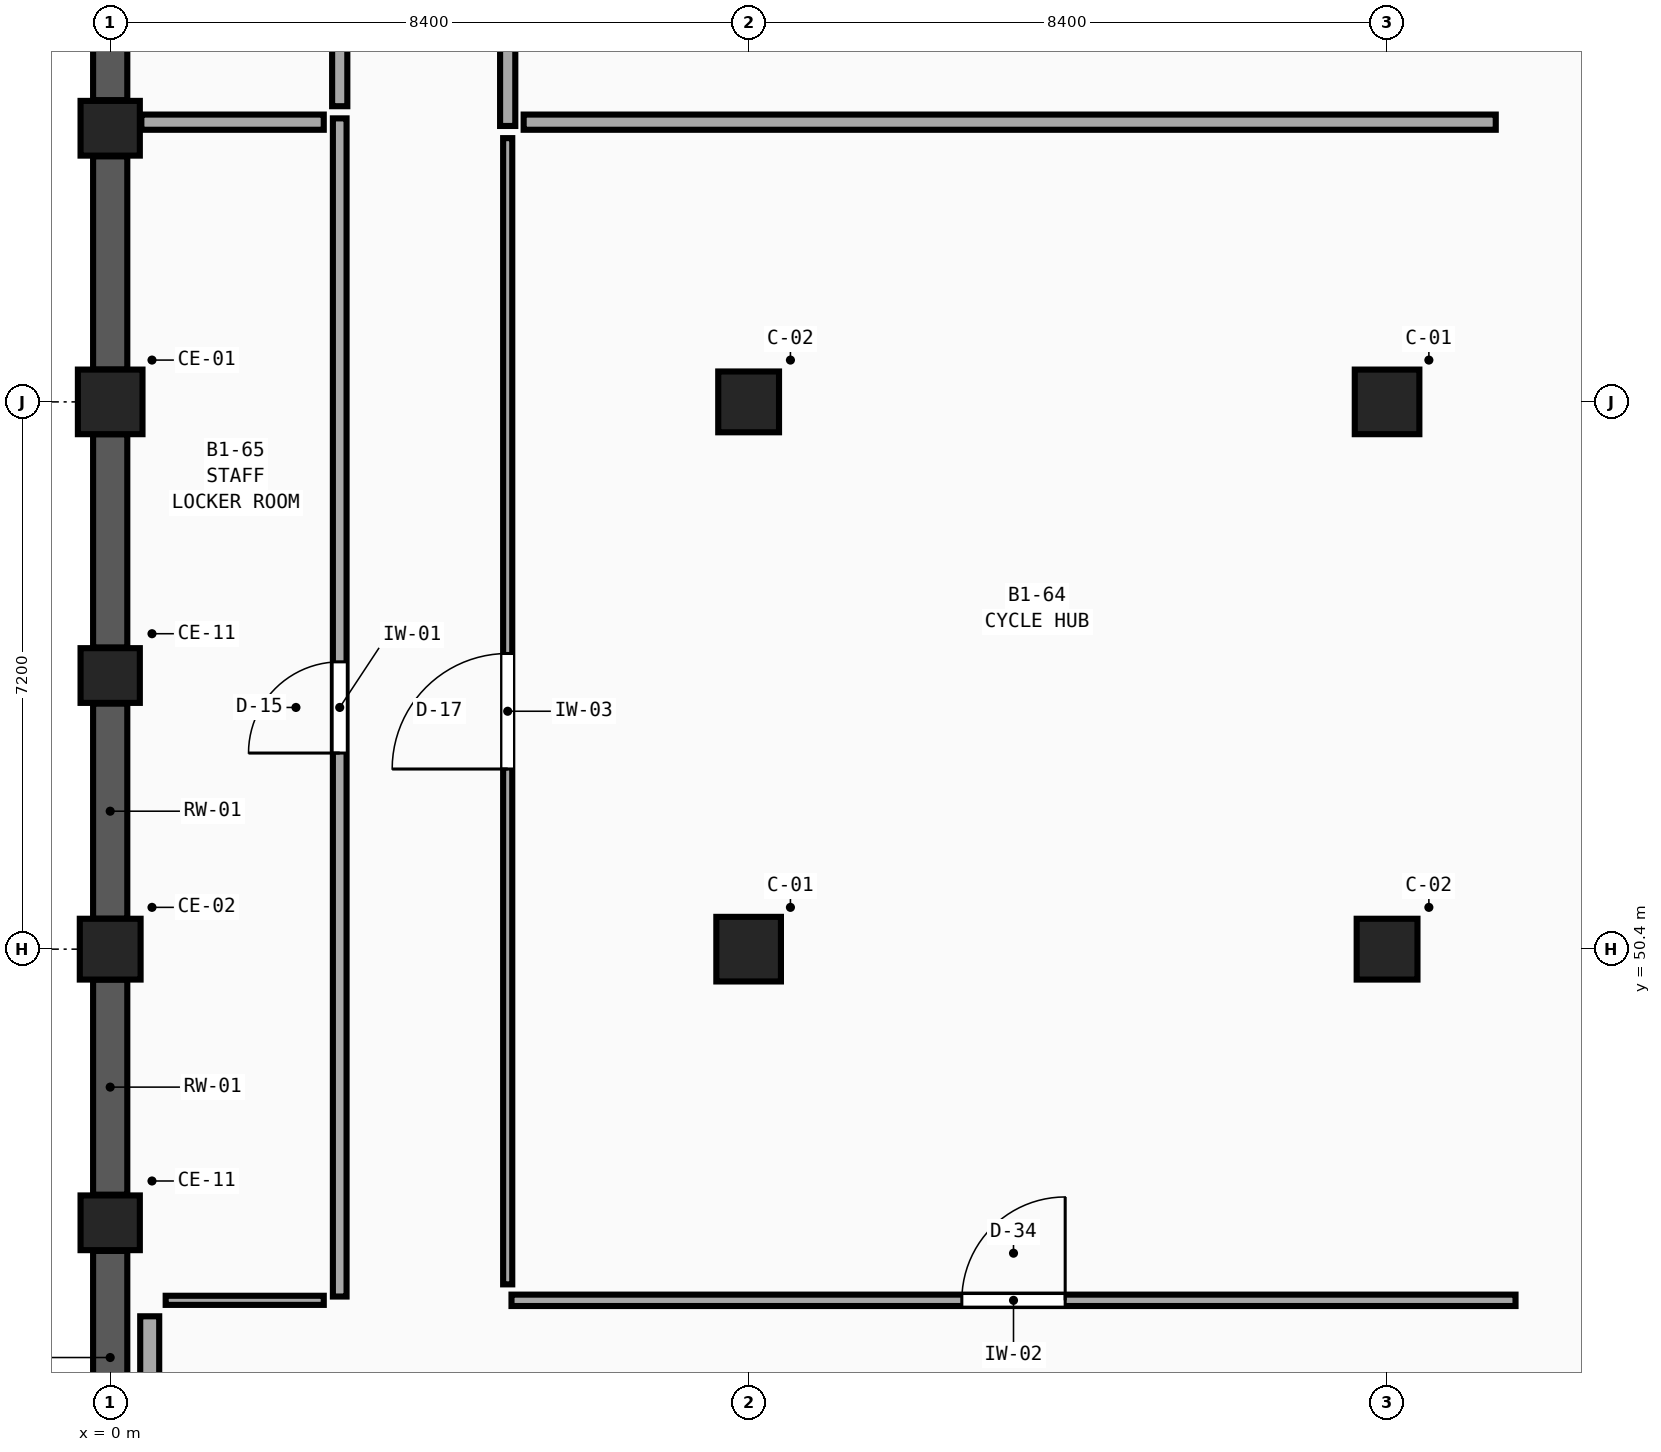
"""IFC4 building model, lengths in metres.
Left out: names, types, materials, properties, quantities, classifications, styles, units other than length and angle.
Written with IfcOpenShell. Run it as: python <this file> out.ifc"""

import sys

from ifc_helpers import new_model, si_unit, direction, frame, frame_2d, origin, origin_2d, place, context, subcontext, project, spatial, rectangle, extrude, element, fill, save


model = new_model("IFC4")
c1 = context("Model", 3, precision=1e-05, world=origin(), true_north=direction((0.0, 1.0)))
c2 = subcontext(c1, "Body", "Model", "MODEL_VIEW")
j1 = project(units=[si_unit("LENGTHUNIT", "METRE"), si_unit("PLANEANGLEUNIT", "RADIAN")], contexts=[c1])
p1 = place(None, origin())
s1 = spatial("IfcSite", under=j1, at=p1, CompositionType="ELEMENT")
p2 = place(p1, origin())
s2 = spatial("IfcBuilding", under=s1, at=p2, CompositionType="ELEMENT")
p3 = place(p2, frame((0.0, 0.0, -5.4)))
s3 = spatial("IfcBuildingStorey", under=s2, at=p3, CompositionType="ELEMENT", Elevation=-5.4)
p4 = place(p3, frame((0.0, 50.4, 0.0), z_axis=(0.0, 0.0, 1.0), x_axis=(1.0, 0.0, 0.0)))
e1 = element("IfcColumn", 1, at=p4, inside=s3, PredefinedType="COLUMN", context=c2, shape_type="SweptSolid", body=[
    extrude(rectangle(XDim=0.8, YDim=0.8, at=origin_2d()), origin(), (0.0, 0.0, 1.0), 5.4),
])
for number, where, z_axis, x_axis in (
    (2, (0.0, 57.6, 0.0), (0.0, 0.0, 1.0), (1.0, 0.0, 0.0)),
    (3, (8.4, 50.4, 0.0), (0.0, 0.0, 1.0), (1.0, 0.0, 0.0)),
):
    element("IfcColumn", number, at=place(p3, frame(where, z_axis=z_axis, x_axis=x_axis)), inside=s3, PredefinedType="COLUMN", context=c2, shape_type="SweptSolid", body=[
        extrude(rectangle(XDim=0.85, YDim=0.85, at=origin_2d()), origin(), (0.0, 0.0, 1.0), 5.4),
    ])
for number, where, z_axis, x_axis in (
    (4, (8.4, 57.6, 0.0), (0.0, 0.0, 1.0), (1.0, 0.0, 0.0)),
    (5, (16.8, 50.4, 0.0), (0.0, 0.0, 1.0), (1.0, 0.0, 0.0)),
):
    element("IfcColumn", number, at=place(p3, frame(where, z_axis=z_axis, x_axis=x_axis)), inside=s3, PredefinedType="COLUMN", context=c2, shape_type="SweptSolid", body=[
        extrude(rectangle(XDim=0.8, YDim=0.8, at=origin_2d()), origin(), (0.0, 0.0, 1.0), 5.4),
    ])
p5 = place(p3, frame((16.8, 57.6, 0.0), z_axis=(0.0, 0.0, 1.0), x_axis=(1.0, 0.0, 0.0)))
e6 = element("IfcColumn", 6, at=p5, inside=s3, PredefinedType="COLUMN", context=c2, shape_type="SweptSolid", body=[
    extrude(rectangle(XDim=0.85, YDim=0.85, at=origin_2d()), origin(), (0.0, 0.0, 1.0), 5.4),
])
for number, where, z_axis, x_axis in (
    (7, (0.0, 46.8, 0.0), (0.0, 0.0, 1.0), (1.0, 0.0, 0.0)),
    (8, (0.0, 54.0, 0.0), (0.0, 0.0, 1.0), (1.0, 0.0, 0.0)),
    (9, (0.0, 61.2, 0.0), (0.0, 0.0, 1.0), (1.0, 0.0, 0.0)),
):
    element("IfcColumn", number, at=place(p3, frame(where, z_axis=z_axis, x_axis=x_axis)), inside=s3, PredefinedType="PILASTER", context=c2, shape_type="SweptSolid", body=[
        extrude(rectangle(XDim=0.78, YDim=0.72, at=origin_2d()), origin(), (0.0, 0.0, 1.0), 5.4),
    ])
p6 = place(p3, frame((0.0, 43.625, 0.0), z_axis=(0.0, 0.0, 1.0), x_axis=(0.0, 1.0, 0.0)))
e10 = element("IfcWall", 10, at=p6, inside=s3, PredefinedType="USERDEFINED", context=c2, shape_type="SweptSolid", body=[
    extrude(rectangle(XDim=2.805, YDim=0.45, at=frame_2d((1.402, 0.0))), origin(), (0.0, 0.0, 1.0), 4.5),
])
p7 = place(p3, frame((0.0, 47.17, 0.0), z_axis=(0.0, 0.0, 1.0), x_axis=(0.0, 1.0, 0.0)))
e11 = element("IfcWall", 11, at=p7, inside=s3, PredefinedType="USERDEFINED", context=c2, shape_type="SweptSolid", body=[
    extrude(rectangle(XDim=2.83, YDim=0.45, at=frame_2d((1.415, 0.0))), origin(), (0.0, 0.0, 1.0), 4.5),
])
p8 = place(p3, frame((0.0, 50.8, 0.0), z_axis=(0.0, 0.0, 1.0), x_axis=(0.0, 1.0, 0.0)))
e12 = element("IfcWall", 12, at=p8, inside=s3, PredefinedType="USERDEFINED", context=c2, shape_type="SweptSolid", body=[
    extrude(rectangle(XDim=2.83, YDim=0.45, at=frame_2d((1.415, 0.0))), origin(), (0.0, 0.0, 1.0), 4.5),
])
p9 = place(p3, frame((0.0, 54.37, 0.0), z_axis=(0.0, 0.0, 1.0), x_axis=(0.0, 1.0, 0.0)))
e13 = element("IfcWall", 13, at=p9, inside=s3, PredefinedType="USERDEFINED", context=c2, shape_type="SweptSolid", body=[
    extrude(rectangle(XDim=2.805, YDim=0.45, at=frame_2d((1.402, 0.0))), origin(), (0.0, 0.0, 1.0), 4.5),
])
p10 = place(p3, frame((0.0, 58.025, 0.0), z_axis=(0.0, 0.0, 1.0), x_axis=(0.0, 1.0, 0.0)))
e14 = element("IfcWall", 14, at=p10, inside=s3, PredefinedType="USERDEFINED", context=c2, shape_type="SweptSolid", body=[
    extrude(rectangle(XDim=2.805, YDim=0.45, at=frame_2d((1.403, 0.0))), origin(), (0.0, 0.0, 1.0), 4.5),
])
p11 = place(p3, frame((0.0, 61.57, 0.0), z_axis=(0.0, 0.0, 1.0), x_axis=(0.0, 1.0, 0.0)))
e15 = element("IfcWall", 15, at=p11, inside=s3, PredefinedType="USERDEFINED", context=c2, shape_type="SweptSolid", body=[
    extrude(rectangle(XDim=2.855, YDim=0.45, at=frame_2d((1.427, 0.0))), origin(), (0.0, 0.0, 1.0), 4.5),
])
p12 = place(p3, frame((3.02, 45.83, 0.0), z_axis=(0.0, 0.0, 1.0), x_axis=(0.0, 1.0, 0.0)))
e16 = element("IfcWall", 16, at=p12, inside=s3, PredefinedType="PARTITIONING", context=c2, shape_type="SweptSolid", body=[
    extrude(rectangle(XDim=15.5, YDim=0.18, at=frame_2d((7.75, 0.0))), origin(), (0.0, 0.0, 1.0), 5.05),
])
p13 = place(p12, frame((7.15, 0.0, 0.0)))
e17 = element("IfcOpeningElement", 17, at=p13, cuts=e16, PredefinedType="OPENING", context=c2, shape_type="SweptSolid", body=[
    extrude(rectangle(XDim=1.2, YDim=2.21, at=frame_2d((0.6, 1.105))), frame((0.0, 0.11, 0.0), z_axis=(0.0, -1.0, 0.0), x_axis=(1.0, 0.0, 0.0)), (0.0, 0.0, 1.0), 0.22),
])
p14 = place(p3, frame((5.23, 45.99, 0.0), z_axis=(0.0, 0.0, 1.0), x_axis=(0.0, 1.0, 0.0)))
e18 = element("IfcWall", 18, at=p14, inside=s3, PredefinedType="PARTITIONING", context=c2, shape_type="SweptSolid", body=[
    extrude(rectangle(XDim=15.08, YDim=0.12, at=frame_2d((7.54, 0.0))), origin(), (0.0, 0.0, 1.0), 5.05),
])
p15 = place(p14, frame((6.78, 0.0, 0.0)))
e19 = element("IfcOpeningElement", 19, at=p15, cuts=e18, PredefinedType="OPENING", context=c2, shape_type="SweptSolid", body=[
    extrude(rectangle(XDim=1.52, YDim=2.21, at=frame_2d((0.76, 1.105))), frame((0.0, 0.08, 0.0), z_axis=(0.0, -1.0, 0.0), x_axis=(1.0, 0.0, 0.0)), (0.0, 0.0, 1.0), 0.16),
])
p16 = place(p3, frame((5.28, 45.78, 0.0), z_axis=(0.0, 0.0, 1.0), x_axis=(1.0, 0.0, 0.0)))
e20 = element("IfcWall", 20, at=p16, inside=s3, PredefinedType="PARTITIONING", context=c2, shape_type="SweptSolid", body=[
    extrude(rectangle(XDim=13.21, YDim=0.15, at=frame_2d((6.605, 0.0))), origin(), (0.0, 0.0, 1.0), 5.05),
])
p17 = place(p16, frame((5.925, 0.0, 0.0)))
e21 = element("IfcOpeningElement", 21, at=p17, cuts=e20, PredefinedType="OPENING", context=c2, shape_type="SweptSolid", body=[
    extrude(rectangle(XDim=1.36, YDim=2.45, at=frame_2d((0.68, 1.225))), frame((0.0, 0.095, 0.0), z_axis=(0.0, -1.0, 0.0), x_axis=(1.0, 0.0, 0.0)), (0.0, 0.0, 1.0), 0.19),
])
p18 = place(p3, frame((5.23, 61.23, 0.0), z_axis=(0.0, 0.0, 1.0), x_axis=(0.0, 1.0, 0.0)))
e22 = element("IfcWall", 22, at=p18, inside=s3, PredefinedType="PLUMBINGWALL", context=c2, shape_type="SweptSolid", body=[
    extrude(rectangle(XDim=9.04, YDim=0.2, at=frame_2d((4.52, 0.0))), origin(), (0.0, 0.0, 1.0), 5.05),
])
p19 = place(p18, frame((3.84, 0.0, 0.0)))
e23 = element("IfcOpeningElement", 23, at=p19, cuts=e22, PredefinedType="OPENING", context=c2, shape_type="SweptSolid", body=[
    extrude(rectangle(XDim=1.36, YDim=2.29, at=frame_2d((0.68, 1.145))), frame((0.0, 0.12, 0.0), z_axis=(0.0, -1.0, 0.0), x_axis=(1.0, 0.0, 0.0)), (0.0, 0.0, 1.0), 0.24),
])
p20 = place(p3, frame((3.02, 61.49, 0.0), z_axis=(0.0, 0.0, 1.0), x_axis=(0.0, 1.0, 0.0)))
e24 = element("IfcWall", 24, at=p20, inside=s3, PredefinedType="PLUMBINGWALL", context=c2, shape_type="SweptSolid", body=[
    extrude(rectangle(XDim=8.78, YDim=0.2, at=frame_2d((4.39, 0.0))), origin(), (0.0, 0.0, 1.0), 5.05),
])
p21 = place(p20, frame((3.63, 0.0, 0.0)))
e25 = element("IfcOpeningElement", 25, at=p21, cuts=e24, PredefinedType="OPENING", context=c2, shape_type="SweptSolid", body=[
    extrude(rectangle(XDim=1.52, YDim=2.29, at=frame_2d((0.76, 1.145))), frame((0.0, 0.12, 0.0), z_axis=(0.0, -1.0, 0.0), x_axis=(1.0, 0.0, 0.0)), (0.0, 0.0, 1.0), 0.24),
])
p22 = place(p3, frame((0.73, 45.78, 0.0), z_axis=(0.0, 0.0, 1.0), x_axis=(1.0, 0.0, 0.0)))
e26 = element("IfcWall", 26, at=p22, inside=s3, PredefinedType="PARTITIONING", context=c2, shape_type="SweptSolid", body=[
    extrude(rectangle(XDim=2.08, YDim=0.12, at=frame_2d((1.04, 0.0))), origin(), (0.0, 0.0, 1.0), 5.05),
])
p23 = place(p3, frame((0.52, 43.78, 0.0), z_axis=(0.0, 0.0, 1.0), x_axis=(0.0, 1.0, 0.0)))
e27 = element("IfcWall", 27, at=p23, inside=s3, PredefinedType="SOLIDWALL", context=c2, shape_type="SweptSolid", body=[
    extrude(rectangle(XDim=1.79, YDim=0.25, at=frame_2d((0.895, 0.0))), origin(), (0.0, 0.0, 1.0), 4.5),
])
p24 = place(p3, frame((5.44, 61.28, 0.0), z_axis=(0.0, 0.0, 1.0), x_axis=(1.0, 0.0, 0.0)))
e28 = element("IfcWall", 28, at=p24, inside=s3, PredefinedType="PLUMBINGWALL", context=c2, shape_type="SweptSolid", body=[
    extrude(rectangle(XDim=12.79, YDim=0.2, at=frame_2d((6.395, 0.0))), origin(), (0.0, 0.0, 1.0), 5.05),
])
p25 = place(p3, frame((0.41, 61.28, 0.0), z_axis=(0.0, 0.0, 1.0), x_axis=(1.0, 0.0, 0.0)))
e29 = element("IfcWall", 29, at=p25, inside=s3, PredefinedType="PLUMBINGWALL", context=c2, shape_type="SweptSolid", body=[
    extrude(rectangle(XDim=2.4, YDim=0.2, at=frame_2d((1.2, 0.0))), origin(), (0.0, 0.0, 1.0), 5.05),
])
p26 = place(p13, origin())
e30 = element("IfcDoor", 30, at=p26, inside=s3, OperationType="SINGLE_SWING_LEFT", PredefinedType="DOOR", context=c2, shape_type="SweptSolid", body=[
    extrude(rectangle(XDim=1.2, YDim=2.21, at=frame_2d((0.6, 1.105))), frame((0.0, 0.025, 0.0), z_axis=(0.0, -1.0, 0.0), x_axis=(1.0, 0.0, 0.0)), (0.0, 0.0, 1.0), 0.05),
])
fill(e17, e30)
p27 = place(p15, origin())
e31 = element("IfcDoor", 31, at=p27, inside=s3, OperationType="SINGLE_SWING_LEFT", PredefinedType="DOOR", context=c2, shape_type="SweptSolid", body=[
    extrude(rectangle(XDim=1.52, YDim=2.21, at=frame_2d((0.76, 1.105))), frame((0.0, 0.025, 0.0), z_axis=(0.0, -1.0, 0.0), x_axis=(1.0, 0.0, 0.0)), (0.0, 0.0, 1.0), 0.05),
])
fill(e19, e31)
p28 = place(p17, origin())
e32 = element("IfcDoor", 32, at=p28, inside=s3, OperationType="SINGLE_SWING_RIGHT", PredefinedType="DOOR", context=c2, shape_type="SweptSolid", body=[
    extrude(rectangle(XDim=1.36, YDim=2.45, at=frame_2d((0.68, 1.225))), frame((0.0, 0.025, 0.0), z_axis=(0.0, -1.0, 0.0), x_axis=(1.0, 0.0, 0.0)), (0.0, 0.0, 1.0), 0.05),
])
fill(e21, e32)
save(model, sys.argv[1])
